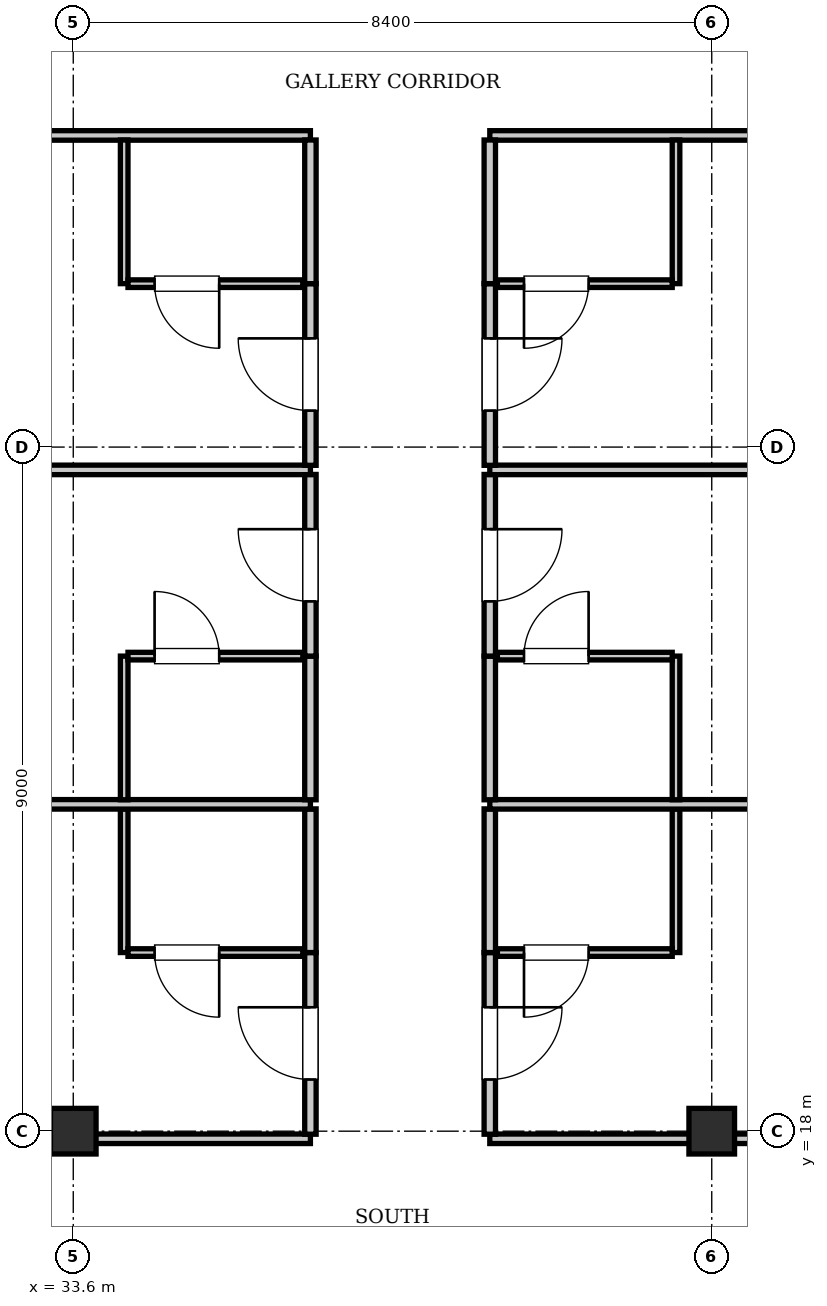
"""IFC4 building model, lengths in metres.
Left out: names, types, materials, properties, quantities, classifications, styles, units other than length and angle.
Written with IfcOpenShell. Run it as: python <this file> out.ifc"""

import sys

from ifc_helpers import new_model, si_unit, direction, frame, frame_2d, origin, origin_2d, place, context, subcontext, project, spatial, rectangle, i_section, extrude, element, fill, save


model = new_model("IFC4")
c1 = context("Model", 3, precision=1e-05, world=origin(), true_north=direction((0.0, 1.0)))
c2 = subcontext(c1, "Body", "Model", "MODEL_VIEW")
j1 = project(units=[si_unit("LENGTHUNIT", "METRE"), si_unit("PLANEANGLEUNIT", "RADIAN")], contexts=[c1])
p1 = place(None, origin())
s1 = spatial("IfcSite", under=j1, at=p1, CompositionType="ELEMENT")
p2 = place(p1, origin())
s2 = spatial("IfcBuilding", under=s1, at=p2, CompositionType="ELEMENT")
p3 = place(p2, frame((0.0, 0.0, 208.25)))
s3 = spatial("IfcBuildingStorey", under=s2, at=p3, CompositionType="ELEMENT", Elevation=208.25)
for number, where, z_axis, x_axis in (
    (1, (33.6, 18.0, 0.0), (0.0, 0.0, 1.0), (1.0, 0.0, 0.0)),
    (2, (42.0, 18.0, 0.0), (0.0, 0.0, 1.0), (1.0, 0.0, 0.0)),
):
    element("IfcColumn", number, at=place(p3, frame(where, z_axis=z_axis, x_axis=x_axis)), inside=s3, PredefinedType="COLUMN", context=c2, shape_type="SweptSolid", body=[
        extrude(i_section(OverallWidth=0.6, OverallDepth=0.6, WebThickness=0.025, FlangeThickness=0.038, at=origin_2d()), origin(), (0.0, 0.0, 1.0), 3.85),
    ])
p4 = place(p3, frame((13.2, 17.9, 0.0), z_axis=(0.0, 0.0, 1.0), x_axis=(1.0, 0.0, 0.0)))
e3 = element("IfcWall", 3, at=p4, inside=s3, PredefinedType="PARTITIONING", context=c2, shape_type="SweptSolid", body=[
    extrude(rectangle(XDim=23.52, YDim=0.125, at=frame_2d((11.76, 0.0))), origin(), (0.0, 0.0, 1.0), 3.071),
])
p5 = place(p3, frame((39.08, 17.9, 0.0), z_axis=(0.0, 0.0, 1.0), x_axis=(1.0, 0.0, 0.0)))
e4 = element("IfcWall", 4, at=p5, inside=s3, PredefinedType="PARTITIONING", context=c2, shape_type="SweptSolid", body=[
    extrude(rectangle(XDim=23.32, YDim=0.125, at=frame_2d((11.66, 0.0))), origin(), (0.0, 0.0, 1.0), 3.071),
])
p6 = place(p3, frame((13.2, 31.1, 0.0), z_axis=(0.0, 0.0, 1.0), x_axis=(1.0, 0.0, 0.0)))
e5 = element("IfcWall", 5, at=p6, inside=s3, PredefinedType="PARTITIONING", context=c2, shape_type="SweptSolid", body=[
    extrude(rectangle(XDim=23.52, YDim=0.125, at=frame_2d((11.76, 0.0))), origin(), (0.0, 0.0, 1.0), 3.61),
])
p7 = place(p3, frame((39.08, 31.1, 0.0), z_axis=(0.0, 0.0, 1.0), x_axis=(1.0, 0.0, 0.0)))
e6 = element("IfcWall", 6, at=p7, inside=s3, PredefinedType="PARTITIONING", context=c2, shape_type="SweptSolid", body=[
    extrude(rectangle(XDim=23.32, YDim=0.125, at=frame_2d((11.66, 0.0))), origin(), (0.0, 0.0, 1.0), 3.61),
])
p8 = place(p3, frame((36.72, 17.96, 0.0), z_axis=(0.0, 0.0, 1.0), x_axis=(0.0, 1.0, 0.0)))
e7 = element("IfcWall", 7, at=p8, inside=s3, PredefinedType="PARTITIONING", context=c2, shape_type="SweptSolid", body=[
    extrude(rectangle(XDim=2.39, YDim=0.15, at=frame_2d((1.195, 0.0))), origin(), (0.0, 0.0, 1.0), 3.61),
])
p9 = place(p8, frame((0.72, 0.0, 0.0)))
e8 = element("IfcOpeningElement", 8, at=p9, cuts=e7, PredefinedType="OPENING", context=c2, shape_type="SweptSolid", body=[
    extrude(rectangle(XDim=0.95, YDim=2.15, at=frame_2d((0.475, 1.075))), frame((0.0, 0.085, 0.0), z_axis=(0.0, -1.0, 0.0), x_axis=(1.0, 0.0, 0.0)), (0.0, 0.0, 1.0), 0.17),
])
p10 = place(p3, frame((36.72, 20.35, 0.0), z_axis=(0.0, 0.0, 1.0), x_axis=(0.0, 1.0, 0.0)))
e9 = element("IfcWall", 9, at=p10, inside=s3, PredefinedType="PARTITIONING", context=c2, shape_type="SweptSolid", body=[
    extrude(rectangle(XDim=1.89, YDim=0.15, at=frame_2d((0.945, 0.0))), origin(), (0.0, 0.0, 1.0), 3.61),
])
p11 = place(p3, frame((34.27, 20.35, 0.0), z_axis=(0.0, 0.0, 1.0), x_axis=(0.0, 1.0, 0.0)))
e10 = element("IfcWall", 10, at=p11, inside=s3, PredefinedType="PARTITIONING", context=c2, shape_type="SweptSolid", body=[
    extrude(rectangle(XDim=1.89, YDim=0.1, at=frame_2d((0.945, 0.0))), origin(), (0.0, 0.0, 1.0), 3.61),
])
p12 = place(p3, frame((34.32, 20.35, 0.0), z_axis=(0.0, 0.0, 1.0), x_axis=(1.0, 0.0, 0.0)))
e11 = element("IfcWall", 11, at=p12, inside=s3, PredefinedType="PARTITIONING", context=c2, shape_type="SweptSolid", body=[
    extrude(rectangle(XDim=2.3, YDim=0.1, at=frame_2d((1.15, 0.0))), origin(), (0.0, 0.0, 1.0), 3.61),
])
p13 = place(p12, frame((0.35, 0.0, 0.0)))
e12 = element("IfcOpeningElement", 12, at=p13, cuts=e11, PredefinedType="OPENING", context=c2, shape_type="SweptSolid", body=[
    extrude(rectangle(XDim=0.85, YDim=2.1, at=frame_2d((0.425, 1.05))), frame((0.0, 0.06, 0.0), z_axis=(0.0, -1.0, 0.0), x_axis=(1.0, 0.0, 0.0)), (0.0, 0.0, 1.0), 0.12),
])
p14 = place(p3, frame((39.08, 17.96, 0.0), z_axis=(0.0, 0.0, 1.0), x_axis=(0.0, 1.0, 0.0)))
e13 = element("IfcWall", 13, at=p14, inside=s3, PredefinedType="PARTITIONING", context=c2, shape_type="SweptSolid", body=[
    extrude(rectangle(XDim=2.39, YDim=0.15, at=frame_2d((1.195, 0.0))), origin(), (0.0, 0.0, 1.0), 3.61),
])
p15 = place(p14, frame((0.72, 0.0, 0.0)))
e14 = element("IfcOpeningElement", 14, at=p15, cuts=e13, PredefinedType="OPENING", context=c2, shape_type="SweptSolid", body=[
    extrude(rectangle(XDim=0.95, YDim=2.15, at=frame_2d((0.475, 1.075))), frame((0.0, 0.085, 0.0), z_axis=(0.0, -1.0, 0.0), x_axis=(1.0, 0.0, 0.0)), (0.0, 0.0, 1.0), 0.17),
])
p16 = place(p3, frame((39.08, 20.35, 0.0), z_axis=(0.0, 0.0, 1.0), x_axis=(0.0, 1.0, 0.0)))
e15 = element("IfcWall", 15, at=p16, inside=s3, PredefinedType="PARTITIONING", context=c2, shape_type="SweptSolid", body=[
    extrude(rectangle(XDim=1.89, YDim=0.15, at=frame_2d((0.945, 0.0))), origin(), (0.0, 0.0, 1.0), 3.61),
])
p17 = place(p3, frame((41.53, 20.35, 0.0), z_axis=(0.0, 0.0, 1.0), x_axis=(0.0, 1.0, 0.0)))
e16 = element("IfcWall", 16, at=p17, inside=s3, PredefinedType="PARTITIONING", context=c2, shape_type="SweptSolid", body=[
    extrude(rectangle(XDim=1.89, YDim=0.1, at=frame_2d((0.945, 0.0))), origin(), (0.0, 0.0, 1.0), 3.61),
])
p18 = place(p3, frame((39.18, 20.35, 0.0), z_axis=(0.0, 0.0, 1.0), x_axis=(1.0, 0.0, 0.0)))
e17 = element("IfcWall", 17, at=p18, inside=s3, PredefinedType="PARTITIONING", context=c2, shape_type="SweptSolid", body=[
    extrude(rectangle(XDim=2.3, YDim=0.1, at=frame_2d((1.15, 0.0))), origin(), (0.0, 0.0, 1.0), 3.61),
])
p19 = place(p18, frame((0.35, 0.0, 0.0)))
e18 = element("IfcOpeningElement", 18, at=p19, cuts=e17, PredefinedType="OPENING", context=c2, shape_type="SweptSolid", body=[
    extrude(rectangle(XDim=0.85, YDim=2.1, at=frame_2d((0.425, 1.05))), frame((0.0, 0.06, 0.0), z_axis=(0.0, -1.0, 0.0), x_axis=(1.0, 0.0, 0.0)), (0.0, 0.0, 1.0), 0.12),
])
p20 = place(p3, frame((13.2, 22.3, 0.0), z_axis=(0.0, 0.0, 1.0), x_axis=(1.0, 0.0, 0.0)))
e19 = element("IfcWall", 19, at=p20, inside=s3, PredefinedType="PARTITIONING", context=c2, shape_type="SweptSolid", body=[
    extrude(rectangle(XDim=23.52, YDim=0.125, at=frame_2d((11.76, 0.0))), origin(), (0.0, 0.0, 1.0), 3.61),
])
p21 = place(p3, frame((39.08, 22.3, 0.0), z_axis=(0.0, 0.0, 1.0), x_axis=(1.0, 0.0, 0.0)))
e20 = element("IfcWall", 20, at=p21, inside=s3, PredefinedType="PARTITIONING", context=c2, shape_type="SweptSolid", body=[
    extrude(rectangle(XDim=23.32, YDim=0.125, at=frame_2d((11.66, 0.0))), origin(), (0.0, 0.0, 1.0), 3.61),
])
p22 = place(p3, frame((36.72, 22.36, 0.0), z_axis=(0.0, 0.0, 1.0), x_axis=(0.0, 1.0, 0.0)))
e21 = element("IfcWall", 21, at=p22, inside=s3, PredefinedType="PARTITIONING", context=c2, shape_type="SweptSolid", body=[
    extrude(rectangle(XDim=1.89, YDim=0.15, at=frame_2d((0.945, 0.0))), origin(), (0.0, 0.0, 1.0), 3.61),
])
p23 = place(p3, frame((36.72, 24.25, 0.0), z_axis=(0.0, 0.0, 1.0), x_axis=(0.0, 1.0, 0.0)))
e22 = element("IfcWall", 22, at=p23, inside=s3, PredefinedType="PARTITIONING", context=c2, shape_type="SweptSolid", body=[
    extrude(rectangle(XDim=2.39, YDim=0.15, at=frame_2d((1.195, 0.0))), origin(), (0.0, 0.0, 1.0), 3.61),
])
p24 = place(p23, frame((0.72, 0.0, 0.0)))
e23 = element("IfcOpeningElement", 23, at=p24, cuts=e22, PredefinedType="OPENING", context=c2, shape_type="SweptSolid", body=[
    extrude(rectangle(XDim=0.95, YDim=2.15, at=frame_2d((0.475, 1.075))), frame((0.0, 0.085, 0.0), z_axis=(0.0, -1.0, 0.0), x_axis=(1.0, 0.0, 0.0)), (0.0, 0.0, 1.0), 0.17),
])
p25 = place(p3, frame((34.27, 22.36, 0.0), z_axis=(0.0, 0.0, 1.0), x_axis=(0.0, 1.0, 0.0)))
e24 = element("IfcWall", 24, at=p25, inside=s3, PredefinedType="PARTITIONING", context=c2, shape_type="SweptSolid", body=[
    extrude(rectangle(XDim=1.89, YDim=0.1, at=frame_2d((0.945, 0.0))), origin(), (0.0, 0.0, 1.0), 3.61),
])
p26 = place(p3, frame((34.32, 24.25, 0.0), z_axis=(0.0, 0.0, 1.0), x_axis=(1.0, 0.0, 0.0)))
e25 = element("IfcWall", 25, at=p26, inside=s3, PredefinedType="PARTITIONING", context=c2, shape_type="SweptSolid", body=[
    extrude(rectangle(XDim=2.3, YDim=0.1, at=frame_2d((1.15, 0.0))), origin(), (0.0, 0.0, 1.0), 3.61),
])
p27 = place(p26, frame((0.35, 0.0, 0.0)))
e26 = element("IfcOpeningElement", 26, at=p27, cuts=e25, PredefinedType="OPENING", context=c2, shape_type="SweptSolid", body=[
    extrude(rectangle(XDim=0.85, YDim=2.1, at=frame_2d((0.425, 1.05))), frame((0.0, 0.06, 0.0), z_axis=(0.0, -1.0, 0.0), x_axis=(1.0, 0.0, 0.0)), (0.0, 0.0, 1.0), 0.12),
])
p28 = place(p3, frame((39.08, 22.36, 0.0), z_axis=(0.0, 0.0, 1.0), x_axis=(0.0, 1.0, 0.0)))
e27 = element("IfcWall", 27, at=p28, inside=s3, PredefinedType="PARTITIONING", context=c2, shape_type="SweptSolid", body=[
    extrude(rectangle(XDim=1.89, YDim=0.15, at=frame_2d((0.945, 0.0))), origin(), (0.0, 0.0, 1.0), 3.61),
])
p29 = place(p3, frame((39.08, 24.25, 0.0), z_axis=(0.0, 0.0, 1.0), x_axis=(0.0, 1.0, 0.0)))
e28 = element("IfcWall", 28, at=p29, inside=s3, PredefinedType="PARTITIONING", context=c2, shape_type="SweptSolid", body=[
    extrude(rectangle(XDim=2.39, YDim=0.15, at=frame_2d((1.195, 0.0))), origin(), (0.0, 0.0, 1.0), 3.61),
])
p30 = place(p29, frame((0.72, 0.0, 0.0)))
e29 = element("IfcOpeningElement", 29, at=p30, cuts=e28, PredefinedType="OPENING", context=c2, shape_type="SweptSolid", body=[
    extrude(rectangle(XDim=0.95, YDim=2.15, at=frame_2d((0.475, 1.075))), frame((0.0, 0.085, 0.0), z_axis=(0.0, -1.0, 0.0), x_axis=(1.0, 0.0, 0.0)), (0.0, 0.0, 1.0), 0.17),
])
p31 = place(p3, frame((41.53, 22.36, 0.0), z_axis=(0.0, 0.0, 1.0), x_axis=(0.0, 1.0, 0.0)))
e30 = element("IfcWall", 30, at=p31, inside=s3, PredefinedType="PARTITIONING", context=c2, shape_type="SweptSolid", body=[
    extrude(rectangle(XDim=1.89, YDim=0.1, at=frame_2d((0.945, 0.0))), origin(), (0.0, 0.0, 1.0), 3.61),
])
p32 = place(p3, frame((39.18, 24.25, 0.0), z_axis=(0.0, 0.0, 1.0), x_axis=(1.0, 0.0, 0.0)))
e31 = element("IfcWall", 31, at=p32, inside=s3, PredefinedType="PARTITIONING", context=c2, shape_type="SweptSolid", body=[
    extrude(rectangle(XDim=2.3, YDim=0.1, at=frame_2d((1.15, 0.0))), origin(), (0.0, 0.0, 1.0), 3.61),
])
p33 = place(p32, frame((0.35, 0.0, 0.0)))
e32 = element("IfcOpeningElement", 32, at=p33, cuts=e31, PredefinedType="OPENING", context=c2, shape_type="SweptSolid", body=[
    extrude(rectangle(XDim=0.85, YDim=2.1, at=frame_2d((0.425, 1.05))), frame((0.0, 0.06, 0.0), z_axis=(0.0, -1.0, 0.0), x_axis=(1.0, 0.0, 0.0)), (0.0, 0.0, 1.0), 0.12),
])
p34 = place(p3, frame((13.2, 26.7, 0.0), z_axis=(0.0, 0.0, 1.0), x_axis=(1.0, 0.0, 0.0)))
e33 = element("IfcWall", 33, at=p34, inside=s3, PredefinedType="PARTITIONING", context=c2, shape_type="SweptSolid", body=[
    extrude(rectangle(XDim=23.52, YDim=0.125, at=frame_2d((11.76, 0.0))), origin(), (0.0, 0.0, 1.0), 3.61),
])
p35 = place(p3, frame((39.08, 26.7, 0.0), z_axis=(0.0, 0.0, 1.0), x_axis=(1.0, 0.0, 0.0)))
e34 = element("IfcWall", 34, at=p35, inside=s3, PredefinedType="PARTITIONING", context=c2, shape_type="SweptSolid", body=[
    extrude(rectangle(XDim=23.32, YDim=0.125, at=frame_2d((11.66, 0.0))), origin(), (0.0, 0.0, 1.0), 3.61),
])
p36 = place(p3, frame((36.72, 26.76, 0.0), z_axis=(0.0, 0.0, 1.0), x_axis=(0.0, 1.0, 0.0)))
e35 = element("IfcWall", 35, at=p36, inside=s3, PredefinedType="PARTITIONING", context=c2, shape_type="SweptSolid", body=[
    extrude(rectangle(XDim=2.39, YDim=0.15, at=frame_2d((1.195, 0.0))), origin(), (0.0, 0.0, 1.0), 3.61),
])
p37 = place(p36, frame((0.72, 0.0, 0.0)))
e36 = element("IfcOpeningElement", 36, at=p37, cuts=e35, PredefinedType="OPENING", context=c2, shape_type="SweptSolid", body=[
    extrude(rectangle(XDim=0.95, YDim=2.15, at=frame_2d((0.475, 1.075))), frame((0.0, 0.085, 0.0), z_axis=(0.0, -1.0, 0.0), x_axis=(1.0, 0.0, 0.0)), (0.0, 0.0, 1.0), 0.17),
])
p38 = place(p3, frame((36.72, 29.15, 0.0), z_axis=(0.0, 0.0, 1.0), x_axis=(0.0, 1.0, 0.0)))
e37 = element("IfcWall", 37, at=p38, inside=s3, PredefinedType="PARTITIONING", context=c2, shape_type="SweptSolid", body=[
    extrude(rectangle(XDim=1.89, YDim=0.15, at=frame_2d((0.945, 0.0))), origin(), (0.0, 0.0, 1.0), 3.61),
])
p39 = place(p3, frame((34.27, 29.15, 0.0), z_axis=(0.0, 0.0, 1.0), x_axis=(0.0, 1.0, 0.0)))
e38 = element("IfcWall", 38, at=p39, inside=s3, PredefinedType="PARTITIONING", context=c2, shape_type="SweptSolid", body=[
    extrude(rectangle(XDim=1.89, YDim=0.1, at=frame_2d((0.945, 0.0))), origin(), (0.0, 0.0, 1.0), 3.61),
])
p40 = place(p3, frame((34.32, 29.15, 0.0), z_axis=(0.0, 0.0, 1.0), x_axis=(1.0, 0.0, 0.0)))
e39 = element("IfcWall", 39, at=p40, inside=s3, PredefinedType="PARTITIONING", context=c2, shape_type="SweptSolid", body=[
    extrude(rectangle(XDim=2.3, YDim=0.1, at=frame_2d((1.15, 0.0))), origin(), (0.0, 0.0, 1.0), 3.61),
])
p41 = place(p40, frame((0.35, 0.0, 0.0)))
e40 = element("IfcOpeningElement", 40, at=p41, cuts=e39, PredefinedType="OPENING", context=c2, shape_type="SweptSolid", body=[
    extrude(rectangle(XDim=0.85, YDim=2.1, at=frame_2d((0.425, 1.05))), frame((0.0, 0.06, 0.0), z_axis=(0.0, -1.0, 0.0), x_axis=(1.0, 0.0, 0.0)), (0.0, 0.0, 1.0), 0.12),
])
p42 = place(p3, frame((39.08, 26.76, 0.0), z_axis=(0.0, 0.0, 1.0), x_axis=(0.0, 1.0, 0.0)))
e41 = element("IfcWall", 41, at=p42, inside=s3, PredefinedType="PARTITIONING", context=c2, shape_type="SweptSolid", body=[
    extrude(rectangle(XDim=2.39, YDim=0.15, at=frame_2d((1.195, 0.0))), origin(), (0.0, 0.0, 1.0), 3.61),
])
p43 = place(p42, frame((0.72, 0.0, 0.0)))
e42 = element("IfcOpeningElement", 42, at=p43, cuts=e41, PredefinedType="OPENING", context=c2, shape_type="SweptSolid", body=[
    extrude(rectangle(XDim=0.95, YDim=2.15, at=frame_2d((0.475, 1.075))), frame((0.0, 0.085, 0.0), z_axis=(0.0, -1.0, 0.0), x_axis=(1.0, 0.0, 0.0)), (0.0, 0.0, 1.0), 0.17),
])
p44 = place(p3, frame((39.08, 29.15, 0.0), z_axis=(0.0, 0.0, 1.0), x_axis=(0.0, 1.0, 0.0)))
e43 = element("IfcWall", 43, at=p44, inside=s3, PredefinedType="PARTITIONING", context=c2, shape_type="SweptSolid", body=[
    extrude(rectangle(XDim=1.89, YDim=0.15, at=frame_2d((0.945, 0.0))), origin(), (0.0, 0.0, 1.0), 3.61),
])
p45 = place(p3, frame((41.53, 29.15, 0.0), z_axis=(0.0, 0.0, 1.0), x_axis=(0.0, 1.0, 0.0)))
e44 = element("IfcWall", 44, at=p45, inside=s3, PredefinedType="PARTITIONING", context=c2, shape_type="SweptSolid", body=[
    extrude(rectangle(XDim=1.89, YDim=0.1, at=frame_2d((0.945, 0.0))), origin(), (0.0, 0.0, 1.0), 3.61),
])
p46 = place(p3, frame((39.18, 29.15, 0.0), z_axis=(0.0, 0.0, 1.0), x_axis=(1.0, 0.0, 0.0)))
e45 = element("IfcWall", 45, at=p46, inside=s3, PredefinedType="PARTITIONING", context=c2, shape_type="SweptSolid", body=[
    extrude(rectangle(XDim=2.3, YDim=0.1, at=frame_2d((1.15, 0.0))), origin(), (0.0, 0.0, 1.0), 3.61),
])
p47 = place(p46, frame((0.35, 0.0, 0.0)))
e46 = element("IfcOpeningElement", 46, at=p47, cuts=e45, PredefinedType="OPENING", context=c2, shape_type="SweptSolid", body=[
    extrude(rectangle(XDim=0.85, YDim=2.1, at=frame_2d((0.425, 1.05))), frame((0.0, 0.06, 0.0), z_axis=(0.0, -1.0, 0.0), x_axis=(1.0, 0.0, 0.0)), (0.0, 0.0, 1.0), 0.12),
])
p48 = place(p13, frame((0.85, 0.0, 0.0), z_axis=(0.0, 0.0, 1.0), x_axis=(-1.0, 0.0, 0.0)))
e47 = element("IfcDoor", 47, at=p48, inside=s3, OperationType="SINGLE_SWING_LEFT", PredefinedType="DOOR", context=c2, shape_type="SweptSolid", body=[
    extrude(rectangle(XDim=0.85, YDim=2.1, at=frame_2d((0.425, 1.05))), frame((0.0, 0.025, 0.0), z_axis=(0.0, -1.0, 0.0), x_axis=(1.0, 0.0, 0.0)), (0.0, 0.0, 1.0), 0.05),
])
fill(e12, e47)
p49 = place(p9, origin())
e48 = element("IfcDoor", 48, at=p49, inside=s3, OperationType="SINGLE_SWING_RIGHT", PredefinedType="DOOR", context=c2, shape_type="SweptSolid", body=[
    extrude(rectangle(XDim=0.95, YDim=2.15, at=frame_2d((0.475, 1.075))), frame((0.0, 0.025, 0.0), z_axis=(0.0, -1.0, 0.0), x_axis=(1.0, 0.0, 0.0)), (0.0, 0.0, 1.0), 0.05),
])
fill(e8, e48)
p50 = place(p19, frame((0.85, 0.0, 0.0), z_axis=(0.0, 0.0, 1.0), x_axis=(-1.0, 0.0, 0.0)))
e49 = element("IfcDoor", 49, at=p50, inside=s3, OperationType="SINGLE_SWING_RIGHT", PredefinedType="DOOR", context=c2, shape_type="SweptSolid", body=[
    extrude(rectangle(XDim=0.85, YDim=2.1, at=frame_2d((0.425, 1.05))), frame((0.0, 0.025, 0.0), z_axis=(0.0, -1.0, 0.0), x_axis=(1.0, 0.0, 0.0)), (0.0, 0.0, 1.0), 0.05),
])
fill(e18, e49)
p51 = place(p15, frame((0.95, 0.0, 0.0), z_axis=(0.0, 0.0, 1.0), x_axis=(-1.0, 0.0, 0.0)))
e50 = element("IfcDoor", 50, at=p51, inside=s3, OperationType="SINGLE_SWING_LEFT", PredefinedType="DOOR", context=c2, shape_type="SweptSolid", body=[
    extrude(rectangle(XDim=0.95, YDim=2.15, at=frame_2d((0.475, 1.075))), frame((0.0, 0.025, 0.0), z_axis=(0.0, -1.0, 0.0), x_axis=(1.0, 0.0, 0.0)), (0.0, 0.0, 1.0), 0.05),
])
fill(e14, e50)
p52 = place(p27, origin())
e51 = element("IfcDoor", 51, at=p52, inside=s3, OperationType="SINGLE_SWING_LEFT", PredefinedType="DOOR", context=c2, shape_type="SweptSolid", body=[
    extrude(rectangle(XDim=0.85, YDim=2.1, at=frame_2d((0.425, 1.05))), frame((0.0, 0.025, 0.0), z_axis=(0.0, -1.0, 0.0), x_axis=(1.0, 0.0, 0.0)), (0.0, 0.0, 1.0), 0.05),
])
fill(e26, e51)
p53 = place(p24, origin())
e52 = element("IfcDoor", 52, at=p53, inside=s3, OperationType="SINGLE_SWING_RIGHT", PredefinedType="DOOR", context=c2, shape_type="SweptSolid", body=[
    extrude(rectangle(XDim=0.95, YDim=2.15, at=frame_2d((0.475, 1.075))), frame((0.0, 0.025, 0.0), z_axis=(0.0, -1.0, 0.0), x_axis=(1.0, 0.0, 0.0)), (0.0, 0.0, 1.0), 0.05),
])
fill(e23, e52)
p54 = place(p33, origin())
e53 = element("IfcDoor", 53, at=p54, inside=s3, OperationType="SINGLE_SWING_RIGHT", PredefinedType="DOOR", context=c2, shape_type="SweptSolid", body=[
    extrude(rectangle(XDim=0.85, YDim=2.1, at=frame_2d((0.425, 1.05))), frame((0.0, 0.025, 0.0), z_axis=(0.0, -1.0, 0.0), x_axis=(1.0, 0.0, 0.0)), (0.0, 0.0, 1.0), 0.05),
])
fill(e32, e53)
p55 = place(p30, frame((0.95, 0.0, 0.0), z_axis=(0.0, 0.0, 1.0), x_axis=(-1.0, 0.0, 0.0)))
e54 = element("IfcDoor", 54, at=p55, inside=s3, OperationType="SINGLE_SWING_LEFT", PredefinedType="DOOR", context=c2, shape_type="SweptSolid", body=[
    extrude(rectangle(XDim=0.95, YDim=2.15, at=frame_2d((0.475, 1.075))), frame((0.0, 0.025, 0.0), z_axis=(0.0, -1.0, 0.0), x_axis=(1.0, 0.0, 0.0)), (0.0, 0.0, 1.0), 0.05),
])
fill(e29, e54)
p56 = place(p41, frame((0.85, 0.0, 0.0), z_axis=(0.0, 0.0, 1.0), x_axis=(-1.0, 0.0, 0.0)))
e55 = element("IfcDoor", 55, at=p56, inside=s3, OperationType="SINGLE_SWING_LEFT", PredefinedType="DOOR", context=c2, shape_type="SweptSolid", body=[
    extrude(rectangle(XDim=0.85, YDim=2.1, at=frame_2d((0.425, 1.05))), frame((0.0, 0.025, 0.0), z_axis=(0.0, -1.0, 0.0), x_axis=(1.0, 0.0, 0.0)), (0.0, 0.0, 1.0), 0.05),
])
fill(e40, e55)
p57 = place(p37, origin())
e56 = element("IfcDoor", 56, at=p57, inside=s3, OperationType="SINGLE_SWING_RIGHT", PredefinedType="DOOR", context=c2, shape_type="SweptSolid", body=[
    extrude(rectangle(XDim=0.95, YDim=2.15, at=frame_2d((0.475, 1.075))), frame((0.0, 0.025, 0.0), z_axis=(0.0, -1.0, 0.0), x_axis=(1.0, 0.0, 0.0)), (0.0, 0.0, 1.0), 0.05),
])
fill(e36, e56)
p58 = place(p47, frame((0.85, 0.0, 0.0), z_axis=(0.0, 0.0, 1.0), x_axis=(-1.0, 0.0, 0.0)))
e57 = element("IfcDoor", 57, at=p58, inside=s3, OperationType="SINGLE_SWING_RIGHT", PredefinedType="DOOR", context=c2, shape_type="SweptSolid", body=[
    extrude(rectangle(XDim=0.85, YDim=2.1, at=frame_2d((0.425, 1.05))), frame((0.0, 0.025, 0.0), z_axis=(0.0, -1.0, 0.0), x_axis=(1.0, 0.0, 0.0)), (0.0, 0.0, 1.0), 0.05),
])
fill(e46, e57)
p59 = place(p43, frame((0.95, 0.0, 0.0), z_axis=(0.0, 0.0, 1.0), x_axis=(-1.0, 0.0, 0.0)))
e58 = element("IfcDoor", 58, at=p59, inside=s3, OperationType="SINGLE_SWING_LEFT", PredefinedType="DOOR", context=c2, shape_type="SweptSolid", body=[
    extrude(rectangle(XDim=0.95, YDim=2.15, at=frame_2d((0.475, 1.075))), frame((0.0, 0.025, 0.0), z_axis=(0.0, -1.0, 0.0), x_axis=(1.0, 0.0, 0.0)), (0.0, 0.0, 1.0), 0.05),
])
fill(e42, e58)
save(model, sys.argv[1])
